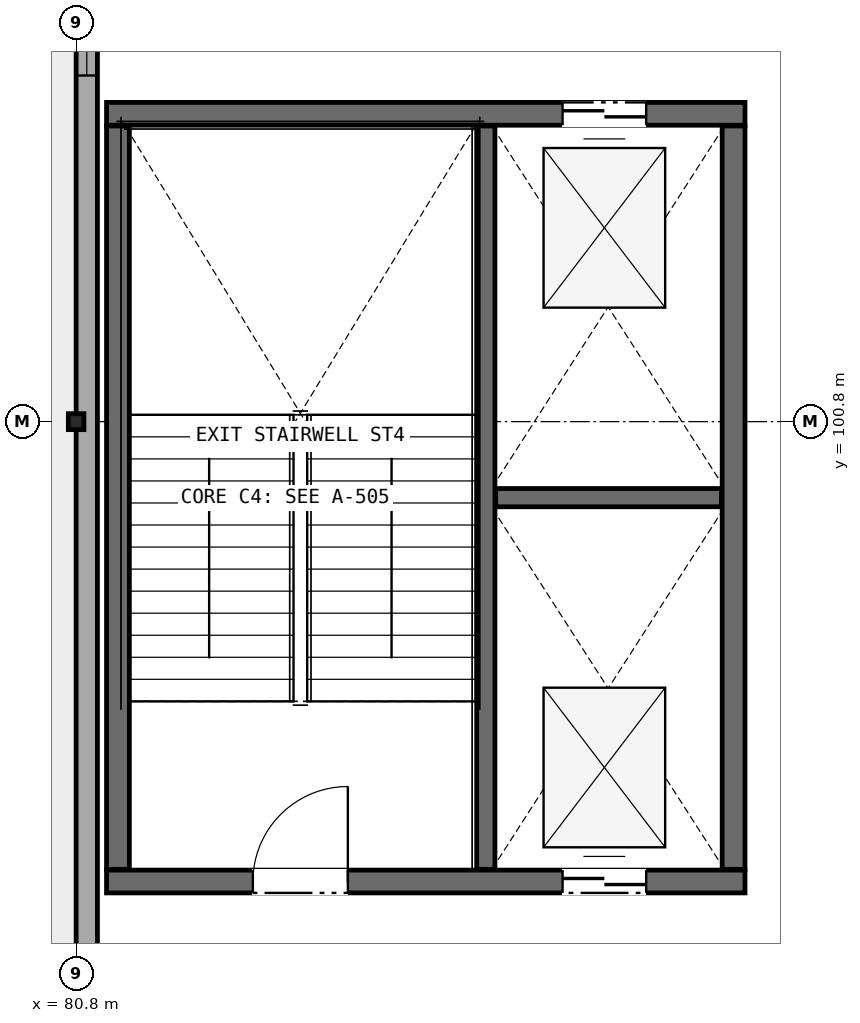
"""IFC4 building model, lengths in metres.
Left out: names, types, materials, properties, quantities, classifications, styles, units other than length and angle.
Written with IfcOpenShell. Run it as: python <this file> out.ifc"""

import sys

from ifc_helpers import new_model, si_unit, direction, frame, frame_2d, origin, origin_2d, place, context, subcontext, project, spatial, rectangle, i_section, extrude, element, fill, save


model = new_model("IFC4")
c1 = context("Model", 3, precision=1e-05, world=origin(), true_north=direction((0.0, 1.0)))
c2 = subcontext(c1, "Body", "Model", "MODEL_VIEW")
j1 = project(units=[si_unit("LENGTHUNIT", "METRE"), si_unit("PLANEANGLEUNIT", "RADIAN")], contexts=[c1])
p1 = place(None, origin())
s1 = spatial("IfcSite", under=j1, at=p1, CompositionType="ELEMENT")
p2 = place(p1, origin())
s2 = spatial("IfcBuilding", under=s1, at=p2, CompositionType="ELEMENT")
p3 = place(p2, frame((0.0, 0.0, 28.1)))
s3 = spatial("IfcBuildingStorey", under=s2, at=p3, CompositionType="ELEMENT", Elevation=28.1)
p4 = place(p3, frame((80.8, 100.8, 0.0), z_axis=(0.0, 0.0, 1.0), x_axis=(1.0, 0.0, 0.0)))
e1 = element("IfcColumn", 1, at=p4, inside=s3, PredefinedType="COLUMN", context=c2, shape_type="SweptSolid", body=[
    extrude(i_section(OverallWidth=0.205, OverallDepth=0.21, WebThickness=0.009, FlangeThickness=0.014, FilletRadius=0.01, at=origin_2d()), origin(), (0.0, 0.0, 1.0), 4.5),
])
p5 = place(p3, frame((80.94, 108.254, 0.0), z_axis=(0.0, 0.0, 1.0), x_axis=(0.0, -1.0, 0.0)))
e2 = element("IfcWall", 2, at=p5, inside=s3, PredefinedType="STANDARD", context=c2, shape_type="SweptSolid", body=[
    extrude(rectangle(XDim=51.308, YDim=0.28, at=frame_2d((25.654, 0.0))), origin(), (0.0, 0.0, 1.0), 3.702),
])
p6 = place(p5, frame((1.8, 0.0, 0.9)))
e3 = element("IfcOpeningElement", 3, at=p6, cuts=e2, PredefinedType="OPENING", context=c2, shape_type="SweptSolid", body=[
    extrude(rectangle(XDim=1.1, YDim=1.85, at=frame_2d((0.55, 0.925))), frame((0.0, 0.15, 0.0), z_axis=(0.0, -1.0, 0.0), x_axis=(1.0, 0.0, 0.0)), (0.0, 0.0, 1.0), 0.3),
])
p7 = place(p5, frame((20.2, 0.0, 0.9)))
e4 = element("IfcOpeningElement", 4, at=p7, cuts=e2, PredefinedType="OPENING", context=c2, shape_type="SweptSolid", body=[
    extrude(rectangle(XDim=1.25, YDim=1.85, at=frame_2d((0.625, 0.925))), frame((0.0, 0.15, 0.0), z_axis=(0.0, -1.0, 0.0), x_axis=(1.0, 0.0, 0.0)), (0.0, 0.0, 1.0), 0.3),
])
p8 = place(p5, frame((29.4, 0.0, 0.9)))
e5 = element("IfcOpeningElement", 5, at=p8, cuts=e2, PredefinedType="OPENING", context=c2, shape_type="SweptSolid", body=[
    extrude(rectangle(XDim=1.4, YDim=1.85, at=frame_2d((0.7, 0.925))), frame((0.0, 0.15, 0.0), z_axis=(0.0, -1.0, 0.0), x_axis=(1.0, 0.0, 0.0)), (0.0, 0.0, 1.0), 0.3),
])
p9 = place(p3, frame((81.2, 94.75, 0.0), z_axis=(0.0, 0.0, 1.0), x_axis=(1.0, 0.0, 0.0)))
e6 = element("IfcWall", 6, at=p9, inside=s3, PredefinedType="SHEAR", context=c2, shape_type="SweptSolid", body=[
    extrude(rectangle(XDim=8.4, YDim=0.3, at=frame_2d((4.2, 0.0))), origin(), (0.0, 0.0, 1.0), 4.245),
])
p10 = place(p9, frame((1.925, 0.0, 0.0)))
e7 = element("IfcOpeningElement", 7, at=p10, cuts=e6, PredefinedType="OPENING", context=c2, shape_type="SweptSolid", body=[
    extrude(rectangle(XDim=1.25, YDim=2.2, at=frame_2d((0.625, 1.1))), frame((0.0, 0.16, 0.0), z_axis=(0.0, -1.0, 0.0), x_axis=(1.0, 0.0, 0.0)), (0.0, 0.0, 1.0), 0.32),
])
p11 = place(p9, frame((6.0, 0.0, 0.0)))
e8 = element("IfcOpeningElement", 8, at=p11, cuts=e6, PredefinedType="OPENING", context=c2, shape_type="SweptSolid", body=[
    extrude(rectangle(XDim=1.1, YDim=2.2, at=frame_2d((0.55, 1.1))), frame((0.0, 0.16, 0.0), z_axis=(0.0, -1.0, 0.0), x_axis=(1.0, 0.0, 0.0)), (0.0, 0.0, 1.0), 0.32),
])
p12 = place(p3, frame((89.6, 104.85, 0.0), z_axis=(0.0, 0.0, 1.0), x_axis=(-1.0, 0.0, 0.0)))
e9 = element("IfcWall", 9, at=p12, inside=s3, PredefinedType="SHEAR", context=c2, shape_type="SweptSolid", body=[
    extrude(rectangle(XDim=8.4, YDim=0.3, at=frame_2d((4.2, 0.0))), origin(), (0.0, 0.0, 1.0), 4.245),
])
p13 = place(p12, frame((1.3, 0.0, 0.0)))
e10 = element("IfcOpeningElement", 10, at=p13, cuts=e9, PredefinedType="OPENING", context=c2, shape_type="SweptSolid", body=[
    extrude(rectangle(XDim=1.1, YDim=2.2, at=frame_2d((0.55, 1.1))), frame((0.0, 0.16, 0.0), z_axis=(0.0, -1.0, 0.0), x_axis=(1.0, 0.0, 0.0)), (0.0, 0.0, 1.0), 0.32),
])
for number, where, z_axis, x_axis in (
    (11, (89.45, 94.91, 0.0), (0.0, 0.0, 1.0), (0.0, 1.0, 0.0)),
    (12, (81.35, 104.69, 0.0), (0.0, 0.0, 1.0), (0.0, -1.0, 0.0)),
):
    element("IfcWall", number, at=place(p3, frame(where, z_axis=z_axis, x_axis=x_axis)), inside=s3, PredefinedType="SHEAR", context=c2, shape_type="SweptSolid", body=[
        extrude(rectangle(XDim=9.78, YDim=0.3, at=frame_2d((4.89, 0.0))), origin(), (0.0, 0.0, 1.0), 4.245),
    ])
p14 = place(p3, frame((86.19, 94.91, 0.0), z_axis=(0.0, 0.0, 1.0), x_axis=(0.0, 1.0, 0.0)))
e13 = element("IfcWall", 13, at=p14, inside=s3, PredefinedType="SOLIDWALL", context=c2, shape_type="SweptSolid", body=[
    extrude(rectangle(XDim=9.78, YDim=0.24, at=frame_2d((4.89, 0.0))), origin(), (0.0, 0.0, 1.0), 4.245),
])
p15 = place(p3, frame((86.32, 99.8, 0.0), z_axis=(0.0, 0.0, 1.0), x_axis=(1.0, 0.0, 0.0)))
e14 = element("IfcWall", 14, at=p15, inside=s3, PredefinedType="SOLIDWALL", context=c2, shape_type="SweptSolid", body=[
    extrude(rectangle(XDim=2.97, YDim=0.24, at=frame_2d((1.485, 0.0))), origin(), (0.0, 0.0, 1.0), 4.245),
])
p16 = place(p6, origin())
e15 = element("IfcWindow", 15, at=p16, inside=s3, PartitioningType="SINGLE_PANEL", PredefinedType="WINDOW", context=c2, shape_type="SweptSolid", body=[
    extrude(rectangle(XDim=1.1, YDim=1.85, at=frame_2d((0.55, 0.925))), frame((0.0, 0.03, 0.0), z_axis=(0.0, -1.0, 0.0), x_axis=(1.0, 0.0, 0.0)), (0.0, 0.0, 1.0), 0.06),
])
fill(e3, e15)
p17 = place(p10, origin())
e16 = element("IfcDoor", 16, at=p17, inside=s3, OperationType="SINGLE_SWING_RIGHT", PredefinedType="DOOR", context=c2, shape_type="SweptSolid", body=[
    extrude(rectangle(XDim=1.25, YDim=2.2, at=frame_2d((0.625, 1.1))), frame((0.0, 0.025, 0.0), z_axis=(0.0, -1.0, 0.0), x_axis=(1.0, 0.0, 0.0)), (0.0, 0.0, 1.0), 0.05),
])
fill(e7, e16)
p18 = place(p11, origin())
e17 = element("IfcDoor", 17, at=p18, inside=s3, OperationType="DOUBLE_DOOR_SLIDING", PredefinedType="DOOR", context=c2, shape_type="SweptSolid", body=[
    extrude(rectangle(XDim=1.1, YDim=2.2, at=frame_2d((0.55, 1.1))), frame((0.0, 0.025, 0.0), z_axis=(0.0, -1.0, 0.0), x_axis=(1.0, 0.0, 0.0)), (0.0, 0.0, 1.0), 0.05),
])
fill(e8, e17)
p19 = place(p13, origin())
e18 = element("IfcDoor", 18, at=p19, inside=s3, OperationType="DOUBLE_DOOR_SLIDING", PredefinedType="DOOR", context=c2, shape_type="SweptSolid", body=[
    extrude(rectangle(XDim=1.1, YDim=2.2, at=frame_2d((0.55, 1.1))), frame((0.0, 0.025, 0.0), z_axis=(0.0, -1.0, 0.0), x_axis=(1.0, 0.0, 0.0)), (0.0, 0.0, 1.0), 0.05),
])
fill(e10, e18)
save(model, sys.argv[1])
